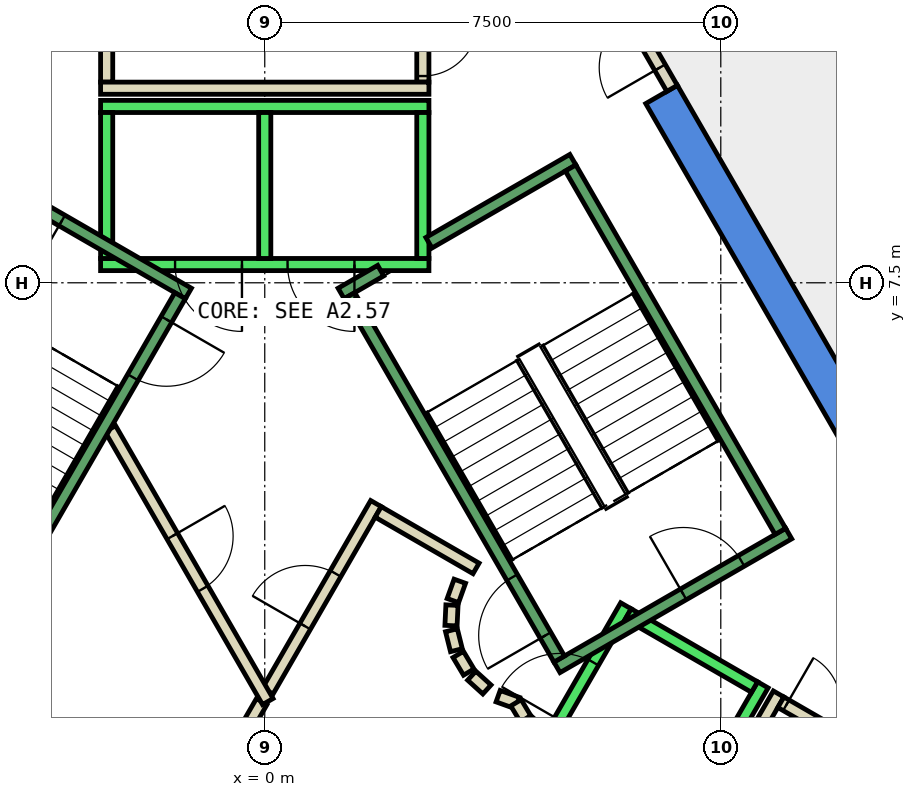
"""IFC4 building model, lengths in metres.
Left out: names, types, materials, properties, quantities, classifications, styles, units other than length and angle.
Written with IfcOpenShell. Run it as: python <this file> out.ifc"""

import sys

from ifc_helpers import new_model, si_unit, direction, frame, frame_2d, origin, place, context, subcontext, project, spatial, polyline, rectangle, outline, extrude, element, fill, save


model = new_model("IFC4")
c1 = context("Model", 3, precision=1e-05, world=origin(), true_north=direction((0.0, 1.0)))
c2 = subcontext(c1, "Body", "Model", "MODEL_VIEW")
j1 = project(units=[si_unit("LENGTHUNIT", "METRE"), si_unit("PLANEANGLEUNIT", "RADIAN")], contexts=[c1])
p1 = place(None, origin())
s1 = spatial("IfcSite", under=j1, at=p1, CompositionType="ELEMENT")
p2 = place(p1, origin())
s2 = spatial("IfcBuilding", under=s1, at=p2, CompositionType="ELEMENT")
p3 = place(p2, frame((0.0, 0.0, 270.2)))
s3 = spatial("IfcBuildingStorey", under=s2, at=p3, CompositionType="ELEMENT", Elevation=270.2)
p4 = place(p3, frame((0.0, 0.0, -0.34)))
e1 = element("IfcWall", 1, at=p4, inside=s3, PredefinedType="SHEAR", context=c2, shape_type="SweptSolid", body=[
    extrude(outline(polyline([(6.786, 10.747), (6.266, 10.447), (10.854, 2.5), (11.547, 2.5), (6.786, 10.747)])), origin(), (0.0, 0.0, 1.0), 3.6),
])
p5 = place(p3, frame((0.0, 0.0, -0.34)))
e2 = element("IfcWall", 2, at=p5, inside=s3, PredefinedType="SHEAR", context=c2, shape_type="SweptSolid", body=[
    extrude(outline(polyline([(5.774, -7.5), (11.547, 2.5), (10.854, 2.5), (5.427, -6.9), (5.774, -7.5)])), origin(), (0.0, 0.0, 1.0), 3.6),
])
p6 = place(p3, frame((9.281, 12.779, 0.0), z_axis=(0.0, 0.0, 1.0), x_axis=(0.515568955032, -0.856848091908, 0.0)))
e3 = element("IfcWall", 3, at=p6, inside=s3, PredefinedType="PARTITIONING", context=c2, shape_type="SweptSolid", body=[
    extrude(rectangle(XDim=3.177, YDim=0.2, at=frame_2d((1.588, 0.0))), origin(), (0.0, 0.0, 1.0), 3.26),
])
p7 = place(p3, frame((-2.6, 10.8, 0.0), z_axis=(0.0, 0.0, 1.0), x_axis=(0.0, 1.0, 0.0)))
e4 = element("IfcWall", 4, at=p7, inside=s3, PredefinedType="PARTITIONING", context=c2, shape_type="SweptSolid", body=[
    extrude(rectangle(XDim=1.1, YDim=0.2, at=frame_2d((0.55, 0.0))), origin(), (0.0, 0.0, 1.0), 3.26),
])
p8 = place(p3, frame((2.6, 11.9, 0.0), z_axis=(0.0, 0.0, 1.0), x_axis=(0.0, -1.0, 0.0)))
e5 = element("IfcWall", 5, at=p8, inside=s3, PredefinedType="PARTITIONING", context=c2, shape_type="SweptSolid", body=[
    extrude(rectangle(XDim=1.1, YDim=0.2, at=frame_2d((0.55, 0.0))), origin(), (0.0, 0.0, 1.0), 3.26),
])
p9 = place(p8, frame((0.1, 0.0, 0.0)))
e6 = element("IfcOpeningElement", 6, at=p9, cuts=e5, PredefinedType="OPENING", context=c2, shape_type="SweptSolid", body=[
    extrude(rectangle(XDim=0.9, YDim=2.1, at=frame_2d((0.45, 1.05))), frame((0.0, 0.11, 0.0), z_axis=(0.0, -1.0, 0.0), x_axis=(1.0, 0.0, 0.0)), (0.0, 0.0, 1.0), 0.22),
])
p10 = place(p3, frame((2.7, 10.7, 0.0), z_axis=(0.0, 0.0, 1.0), x_axis=(-1.0, 0.0, 0.0)))
e7 = element("IfcWall", 7, at=p10, inside=s3, PredefinedType="PARTITIONING", context=c2, shape_type="SweptSolid", body=[
    extrude(rectangle(XDim=5.4, YDim=0.2, at=frame_2d((2.7, 0.0))), origin(), (0.0, 0.0, 1.0), 3.26),
])
p11 = place(p3, frame((5.751, -3.938, 0.0), z_axis=(0.0, 0.0, 1.0), x_axis=(0.500034260056, 0.866005622828, 0.0)))
e8 = element("IfcWall", 8, at=p11, inside=s3, PredefinedType="PARTITIONING", context=c2, shape_type="SweptSolid", body=[
    extrude(rectangle(XDim=5.399, YDim=0.2, at=frame_2d((2.7, 0.0))), origin(), (0.0, 0.0, 1.0), 3.26),
])
p12 = place(p3, frame((8.488, 0.602, 0.0), z_axis=(0.0, 0.0, 1.0), x_axis=(0.866063652425, -0.499933745558, 0.0)))
e9 = element("IfcWall", 9, at=p12, inside=s3, PredefinedType="PARTITIONING", context=c2, shape_type="SweptSolid", body=[
    extrude(rectangle(XDim=1.1, YDim=0.2, at=frame_2d((0.55, 0.0))), origin(), (0.0, 0.0, 1.0), 3.26),
])
p13 = place(p12, frame((0.1, 0.0, 0.0)))
e10 = element("IfcOpeningElement", 10, at=p13, cuts=e9, PredefinedType="OPENING", context=c2, shape_type="SweptSolid", body=[
    extrude(rectangle(XDim=0.9, YDim=2.1, at=frame_2d((0.45, 1.05))), frame((0.0, 0.11, 0.0), z_axis=(0.0, -1.0, 0.0), x_axis=(1.0, 0.0, 0.0)), (0.0, 0.0, 1.0), 0.22),
])
p14 = place(p3, frame((-0.982, -1.0, 0.0), z_axis=(0.0, 0.0, 1.0), x_axis=(0.50024047865, 0.865886518847, 0.0)))
e11 = element("IfcWall", 11, at=p14, inside=s3, PredefinedType="PARTITIONING", context=c2, shape_type="SweptSolid", body=[
    extrude(rectangle(XDim=1.863, YDim=0.2, at=frame_2d((0.931, 0.0))), origin(), (0.0, 0.0, 1.0), 3.26),
])
p15 = place(p3, frame((0.05, 0.787, 0.0), z_axis=(0.0, 0.0, 1.0), x_axis=(0.499954076797, 0.866051915934, 0.0)))
e12 = element("IfcWall", 12, at=p15, inside=s3, PredefinedType="PARTITIONING", context=c2, shape_type="SweptSolid", body=[
    extrude(rectangle(XDim=3.558, YDim=0.2, at=frame_2d((1.779, 0.0))), origin(), (0.0, 0.0, 1.0), 3.26),
])
p16 = place(p15, frame((1.229, 0.0, 0.0)))
e13 = element("IfcOpeningElement", 13, at=p16, cuts=e12, PredefinedType="OPENING", context=c2, shape_type="SweptSolid", body=[
    extrude(rectangle(XDim=1.0, YDim=2.1, at=frame_2d((0.5, 1.05))), frame((0.0, 0.11, 0.0), z_axis=(0.0, -1.0, 0.0), x_axis=(1.0, 0.0, 0.0)), (0.0, 0.0, 1.0), 0.22),
])
p17 = place(p3, frame((1.866, 3.732, 0.0), z_axis=(0.0, 0.0, 1.0), x_axis=(0.866043361281, -0.499968895414, 0.0)))
e14 = element("IfcWall", 14, at=p17, inside=s3, PredefinedType="PARTITIONING", context=c2, shape_type="SweptSolid", body=[
    extrude(rectangle(XDim=1.858, YDim=0.2, at=frame_2d((0.929, 0.0))), origin(), (0.0, 0.0, 1.0), 3.26),
])
p18 = place(p3, frame((3.208, 2.592, 0.0), z_axis=(0.0, 0.0, 1.0), x_axis=(-0.337388820924, -0.941365382578, 0.0)))
e15 = element("IfcWall", 15, at=p18, inside=s3, PredefinedType="PARTITIONING", context=c2, shape_type="SweptSolid", body=[
    extrude(rectangle(XDim=0.338, YDim=0.2, at=frame_2d((0.169, 0.0))), origin(), (0.0, 0.0, 1.0), 3.26),
])
p19 = place(p3, frame((3.079, 2.199, 0.0), z_axis=(0.0, 0.0, 1.0), x_axis=(-0.047771483479, -0.998858290933, 0.0)))
e16 = element("IfcWall", 16, at=p19, inside=s3, PredefinedType="PARTITIONING", context=c2, shape_type="SweptSolid", body=[
    extrude(rectangle(XDim=0.337, YDim=0.2, at=frame_2d((0.169, 0.0))), origin(), (0.0, 0.0, 1.0), 3.26),
])
p20 = place(p3, frame((3.07, 1.786, 0.0), z_axis=(0.0, 0.0, 1.0), x_axis=(0.242705583207, -0.970099994784, 0.0)))
e17 = element("IfcWall", 17, at=p20, inside=s3, PredefinedType="PARTITIONING", context=c2, shape_type="SweptSolid", body=[
    extrude(rectangle(XDim=0.338, YDim=0.2, at=frame_2d((0.169, 0.0))), origin(), (0.0, 0.0, 1.0), 3.26),
])
for number, where, z_axis, x_axis in (
    (18, (3.182, 1.388, 0.0), (0.0, 0.0, 1.0), (0.512, -0.859, 0.0)),
    (19, (3.404, 1.039, 0.0), (0.0, 0.0, 1.0), (0.74, -0.672, 0.0)),
):
    element("IfcWall", number, at=place(p3, frame(where, z_axis=z_axis, x_axis=x_axis)), inside=s3, PredefinedType="PARTITIONING", context=c2, shape_type="SweptSolid", body=[
        extrude(rectangle(XDim=0.338, YDim=0.2, at=frame_2d((0.169, 0.0))), origin(), (0.0, 0.0, 1.0), 3.26),
    ])
p21 = place(p3, frame((3.838, 0.702, 0.0), z_axis=(0.0, 0.0, 1.0), x_axis=(0.941035081519, -0.338308993895, 0.0)))
e20 = element("IfcWall", 20, at=p21, inside=s3, PredefinedType="PARTITIONING", context=c2, shape_type="SweptSolid", body=[
    extrude(rectangle(XDim=0.337, YDim=0.2, at=frame_2d((0.168, 0.0))), origin(), (0.0, 0.0, 1.0), 3.26),
])
p22 = place(p3, frame((4.132, 0.593, 0.0), z_axis=(0.0, 0.0, 1.0), x_axis=(0.513561617048, -0.858052717201, 0.0)))
e21 = element("IfcWall", 21, at=p22, inside=s3, PredefinedType="PARTITIONING", context=c2, shape_type="SweptSolid", body=[
    extrude(rectangle(XDim=0.308, YDim=0.2, at=frame_2d((0.154, 0.0))), origin(), (0.0, 0.0, 1.0), 3.26),
])
p23 = place(p3, frame((4.301, 0.315, 0.0), z_axis=(0.0, 0.0, 1.0), x_axis=(0.741798017506, -0.670623367639, 0.0)))
e22 = element("IfcWall", 22, at=p23, inside=s3, PredefinedType="PARTITIONING", context=c2, shape_type="SweptSolid", body=[
    extrude(rectangle(XDim=0.309, YDim=0.2, at=frame_2d((0.154, 0.0))), origin(), (0.0, 0.0, 1.0), 3.26),
])
p24 = place(p3, frame((-2.54, 5.1, 0.0), z_axis=(0.0, 0.0, 1.0), x_axis=(0.499925051871, -0.866068670783, 0.0)))
e23 = element("IfcWall", 23, at=p24, inside=s3, PredefinedType="PARTITIONING", context=c2, shape_type="SweptSolid", body=[
    extrude(rectangle(XDim=5.181, YDim=0.2, at=frame_2d((2.59, 0.0))), origin(), (0.0, 0.0, 1.0), 3.26),
])
p25 = place(p24, frame((2.04, 0.0, 0.0)))
e24 = element("IfcOpeningElement", 24, at=p25, cuts=e23, PredefinedType="OPENING", context=c2, shape_type="SweptSolid", body=[
    extrude(rectangle(XDim=1.0, YDim=2.1, at=frame_2d((0.5, 1.05))), frame((0.0, 0.11, 0.0), z_axis=(0.0, -1.0, 0.0), x_axis=(1.0, 0.0, 0.0)), (0.0, 0.0, 1.0), 0.22),
])
p26 = place(p3, frame((6.699, 10.697, 0.0), z_axis=(0.0, 0.0, 1.0), x_axis=(-0.499914839587, 0.866074565589, 0.0)))
e25 = element("IfcWall", 25, at=p26, inside=s3, PredefinedType="PARTITIONING", context=c2, shape_type="SweptSolid", body=[
    extrude(rectangle(XDim=1.794, YDim=0.2, at=frame_2d((0.897, 0.0))), origin(), (0.0, 0.0, 1.0), 2.4),
])
p27 = place(p26, frame((0.397, 0.0, 0.0)))
e26 = element("IfcOpeningElement", 26, at=p27, cuts=e25, PredefinedType="OPENING", context=c2, shape_type="SweptSolid", body=[
    extrude(rectangle(XDim=1.0, YDim=2.1, at=frame_2d((0.5, 1.05))), frame((0.0, 0.11, 0.0), z_axis=(0.0, -1.0, 0.0), x_axis=(1.0, 0.0, 0.0)), (0.0, 0.0, 1.0), 0.22),
])
p28 = place(p3, frame((9.25, -4.878, 0.0), z_axis=(0.0, 0.0, 1.0), x_axis=(0.499982416899, 0.866035555154, 0.0)))
e27 = element("IfcWall", 27, at=p28, inside=s3, PredefinedType="PARTITIONING", context=c2, shape_type="SweptSolid", body=[
    extrude(rectangle(XDim=8.048, YDim=0.15, at=frame_2d((4.024, 0.0))), origin(), (0.0, 0.0, 1.0), 3.26),
])
p29 = place(p3, frame((2.7, 7.8, 0.0), z_axis=(0.0, 0.0, 1.0), x_axis=(-1.0, 0.0, 0.0)))
e28 = element("IfcWall", 28, at=p29, inside=s3, PredefinedType="STANDARD", context=c2, shape_type="SweptSolid", body=[
    extrude(rectangle(XDim=5.4, YDim=0.2, at=frame_2d((2.7, 0.0))), origin(), (0.0, 0.0, 1.0), 3.26),
])
p30 = place(p29, frame((1.225, 0.0, 0.0)))
e29 = element("IfcOpeningElement", 29, at=p30, cuts=e28, PredefinedType="OPENING", context=c2, shape_type="SweptSolid", body=[
    extrude(rectangle(XDim=1.1, YDim=2.1, at=frame_2d((0.55, 1.05))), frame((0.0, 0.11, 0.0), z_axis=(0.0, -1.0, 0.0), x_axis=(1.0, 0.0, 0.0)), (0.0, 0.0, 1.0), 0.22),
])
p31 = place(p29, frame((3.075, 0.0, 0.0)))
e30 = element("IfcOpeningElement", 30, at=p31, cuts=e28, PredefinedType="OPENING", context=c2, shape_type="SweptSolid", body=[
    extrude(rectangle(XDim=1.1, YDim=2.1, at=frame_2d((0.55, 1.05))), frame((0.0, 0.11, 0.0), z_axis=(0.0, -1.0, 0.0), x_axis=(1.0, 0.0, 0.0)), (0.0, 0.0, 1.0), 0.22),
])
p32 = place(p3, frame((2.7, 10.4, 0.0), z_axis=(0.0, 0.0, 1.0), x_axis=(-1.0, 0.0, 0.0)))
e31 = element("IfcWall", 31, at=p32, inside=s3, PredefinedType="STANDARD", context=c2, shape_type="SweptSolid", body=[
    extrude(rectangle(XDim=5.4, YDim=0.2, at=frame_2d((2.7, 0.0))), origin(), (0.0, 0.0, 1.0), 3.26),
])
for number, where, z_axis, x_axis in (
    (32, (2.6, 7.9, 0.0), (0.0, 0.0, 1.0), (0.0, 1.0, 0.0)),
    (33, (0.0, 7.9, 0.0), (0.0, 0.0, 1.0), (0.0, 1.0, 0.0)),
    (34, (-2.6, 7.9, 0.0), (0.0, 0.0, 1.0), (0.0, 1.0, 0.0)),
):
    element("IfcWall", number, at=place(p3, frame(where, z_axis=z_axis, x_axis=x_axis)), inside=s3, PredefinedType="STANDARD", context=c2, shape_type="SweptSolid", body=[
        extrude(rectangle(XDim=2.4, YDim=0.2, at=frame_2d((1.2, 0.0))), origin(), (0.0, 0.0, 1.0), 3.26),
    ])
p33 = place(p3, frame((-5.94, 2.188, 0.0), z_axis=(0.0, 0.0, 1.0), x_axis=(0.500034260056, -0.866005622828, 0.0)))
e35 = element("IfcWall", 35, at=p33, inside=s3, PredefinedType="STANDARD", context=c2, shape_type="SweptSolid", body=[
    extrude(rectangle(XDim=5.399, YDim=0.2, at=frame_2d((2.7, 0.0))), origin(), (0.0, 0.0, 1.0), 3.26),
])
p34 = place(p33, frame((3.075, 0.0, 0.0)))
e36 = element("IfcOpeningElement", 36, at=p34, cuts=e35, PredefinedType="OPENING", context=c2, shape_type="SweptSolid", body=[
    extrude(rectangle(XDim=1.1, YDim=2.1, at=frame_2d((0.55, 1.05))), frame((0.0, 0.11, 0.0), z_axis=(0.0, -1.0, 0.0), x_axis=(1.0, 0.0, 0.0)), (0.0, 0.0, 1.0), 0.22),
])
p35 = place(p33, frame((1.225, 0.0, 0.0)))
e37 = element("IfcOpeningElement", 37, at=p35, cuts=e35, PredefinedType="OPENING", context=c2, shape_type="SweptSolid", body=[
    extrude(rectangle(XDim=1.1, YDim=2.1, at=frame_2d((0.55, 1.05))), frame((0.0, 0.11, 0.0), z_axis=(0.0, -1.0, 0.0), x_axis=(1.0, 0.0, 0.0)), (0.0, 0.0, 1.0), 0.22),
])
p36 = place(p3, frame((3.24, -2.488, 0.0), z_axis=(0.0, 0.0, 1.0), x_axis=(0.500034260056, 0.866005622828, 0.0)))
e38 = element("IfcWall", 38, at=p36, inside=s3, PredefinedType="STANDARD", context=c2, shape_type="SweptSolid", body=[
    extrude(rectangle(XDim=5.399, YDim=0.2, at=frame_2d((2.7, 0.0))), origin(), (0.0, 0.0, 1.0), 3.26),
])
p37 = place(p36, frame((3.225, 0.0, 0.0)))
e39 = element("IfcOpeningElement", 39, at=p37, cuts=e38, PredefinedType="OPENING", context=c2, shape_type="SweptSolid", body=[
    extrude(rectangle(XDim=1.1, YDim=2.1, at=frame_2d((0.55, 1.05))), frame((0.0, 0.11, 0.0), z_axis=(0.0, -1.0, 0.0), x_axis=(1.0, 0.0, 0.0)), (0.0, 0.0, 1.0), 0.22),
])
p38 = place(p36, frame((1.225, 0.0, 0.0)))
e40 = element("IfcOpeningElement", 40, at=p38, cuts=e38, PredefinedType="OPENING", context=c2, shape_type="SweptSolid", body=[
    extrude(rectangle(XDim=1.1, YDim=2.1, at=frame_2d((0.55, 1.05))), frame((0.0, 0.11, 0.0), z_axis=(0.0, -1.0, 0.0), x_axis=(1.0, 0.0, 0.0)), (0.0, 0.0, 1.0), 0.22),
])
p39 = place(p3, frame((5.492, -3.788, 0.0), z_axis=(0.0, 0.0, 1.0), x_axis=(0.500034260056, 0.866005622828, 0.0)))
e41 = element("IfcWall", 41, at=p39, inside=s3, PredefinedType="STANDARD", context=c2, shape_type="SweptSolid", body=[
    extrude(rectangle(XDim=5.399, YDim=0.2, at=frame_2d((2.7, 0.0))), origin(), (0.0, 0.0, 1.0), 3.26),
])
p40 = place(p3, frame((5.977, 2.052, 0.0), z_axis=(0.0, 0.0, 1.0), x_axis=(0.865973769406, -0.500089422704, 0.0)))
e42 = element("IfcWall", 42, at=p40, inside=s3, PredefinedType="STANDARD", context=c2, shape_type="SweptSolid", body=[
    extrude(rectangle(XDim=2.399, YDim=0.2, at=frame_2d((1.2, 0.0))), origin(), (0.0, 0.0, 1.0), 3.26),
])
p41 = place(p3, frame((4.806, 1.176, 0.0), z_axis=(0.0, 0.0, 1.0), x_axis=(0.866059941101, 0.499940174841, 0.0)))
e43 = element("IfcWall", 43, at=p41, inside=s3, PredefinedType="STANDARD", context=c2, shape_type="SweptSolid", body=[
    extrude(rectangle(XDim=4.4, YDim=0.2, at=frame_2d((2.2, 0.0))), origin(), (0.0, 0.0, 1.0), 3.26),
])
p42 = place(p41, frame((2.4, 0.0, 0.0)))
e44 = element("IfcOpeningElement", 44, at=p42, cuts=e43, PredefinedType="OPENING", context=c2, shape_type="SweptSolid", body=[
    extrude(rectangle(XDim=1.1, YDim=2.2, at=frame_2d((0.55, 1.1))), frame((0.0, 0.11, 0.0), z_axis=(0.0, -1.0, 0.0), x_axis=(1.0, 0.0, 0.0)), (0.0, 0.0, 1.0), 0.22),
])
p43 = place(p3, frame((2.7, 8.158, 0.0), z_axis=(0.0, 0.0, 1.0), x_axis=(0.86611865017, 0.499838457731, 0.0)))
e45 = element("IfcWall", 45, at=p43, inside=s3, PredefinedType="STANDARD", context=c2, shape_type="SweptSolid", body=[
    extrude(rectangle(XDim=2.733, YDim=0.2, at=frame_2d((1.366, 0.0))), origin(), (0.0, 0.0, 1.0), 3.26),
])
p44 = place(p3, frame((1.256, 7.324, 0.0), z_axis=(0.0, 0.0, 1.0), x_axis=(0.865915093549, 0.500191014278, 0.0)))
e46 = element("IfcWall", 46, at=p44, inside=s3, PredefinedType="STANDARD", context=c2, shape_type="SweptSolid", body=[
    extrude(rectangle(XDim=0.752, YDim=0.2, at=frame_2d((0.376, 0.0))), origin(), (0.0, 0.0, 1.0), 3.26),
])
p45 = place(p3, frame((4.843, 1.312, 0.0), z_axis=(0.0, 0.0, 1.0), x_axis=(-0.499963383562, 0.866046543262, 0.0)))
e47 = element("IfcWall", 47, at=p45, inside=s3, PredefinedType="STANDARD", context=c2, shape_type="SweptSolid", body=[
    extrude(rectangle(XDim=6.9, YDim=0.2, at=frame_2d((3.45, 0.0))), origin(), (0.0, 0.0, 1.0), 3.26),
])
p46 = place(p45, frame((0.45, 0.0, 0.0)))
e48 = element("IfcOpeningElement", 48, at=p46, cuts=e47, PredefinedType="OPENING", context=c2, shape_type="SweptSolid", body=[
    extrude(rectangle(XDim=1.1, YDim=2.2, at=frame_2d((0.55, 1.1))), frame((0.0, 0.11, 0.0), z_axis=(0.0, -1.0, 0.0), x_axis=(1.0, 0.0, 0.0)), (0.0, 0.0, 1.0), 0.22),
])
p47 = place(p3, frame((8.48, 3.412, 0.0), z_axis=(0.0, 0.0, 1.0), x_axis=(-0.499978703459, 0.866037698999, 0.0)))
e49 = element("IfcWall", 49, at=p47, inside=s3, PredefinedType="STANDARD", context=c2, shape_type="SweptSolid", body=[
    extrude(rectangle(XDim=6.9, YDim=0.2, at=frame_2d((3.45, 0.0))), origin(), (0.0, 0.0, 1.0), 3.26),
])
p48 = place(p3, frame((-1.256, 7.324, 0.0), z_axis=(0.0, 0.0, 1.0), x_axis=(-0.866046073146, 0.499964197906, 0.0)))
e50 = element("IfcWall", 50, at=p48, inside=s3, PredefinedType="STANDARD", context=c2, shape_type="SweptSolid", body=[
    extrude(rectangle(XDim=4.4, YDim=0.2, at=frame_2d((2.2, 0.0))), origin(), (0.0, 0.0, 1.0), 3.26),
])
p49 = place(p48, frame((2.4, 0.0, 0.0)))
e51 = element("IfcOpeningElement", 51, at=p49, cuts=e50, PredefinedType="OPENING", context=c2, shape_type="SweptSolid", body=[
    extrude(rectangle(XDim=1.1, YDim=2.2, at=frame_2d((0.55, 1.1))), frame((0.0, 0.11, 0.0), z_axis=(0.0, -1.0, 0.0), x_axis=(1.0, 0.0, 0.0)), (0.0, 0.0, 1.0), 0.22),
])
p50 = place(p3, frame((-1.393, 7.288, 0.0), z_axis=(0.0, 0.0, 1.0), x_axis=(-0.499963383562, -0.866046543262, 0.0)))
e52 = element("IfcWall", 52, at=p50, inside=s3, PredefinedType="STANDARD", context=c2, shape_type="SweptSolid", body=[
    extrude(rectangle(XDim=6.9, YDim=0.2, at=frame_2d((3.45, 0.0))), origin(), (0.0, 0.0, 1.0), 3.26),
])
p51 = place(p50, frame((0.45, 0.0, 0.0)))
e53 = element("IfcOpeningElement", 53, at=p51, cuts=e52, PredefinedType="OPENING", context=c2, shape_type="SweptSolid", body=[
    extrude(rectangle(XDim=1.1, YDim=2.2, at=frame_2d((0.55, 1.1))), frame((0.0, 0.11, 0.0), z_axis=(0.0, -1.0, 0.0), x_axis=(1.0, 0.0, 0.0)), (0.0, 0.0, 1.0), 0.22),
])
p52 = place(p16, origin())
e54 = element("IfcDoor", 54, at=p52, inside=s3, OperationType="SINGLE_SWING_RIGHT", PredefinedType="DOOR", context=c2, shape_type="SweptSolid", body=[
    extrude(rectangle(XDim=1.0, YDim=2.1, at=frame_2d((0.5, 1.05))), frame((0.0, 0.025, 0.0), z_axis=(0.0, -1.0, 0.0), x_axis=(1.0, 0.0, 0.0)), (0.0, 0.0, 1.0), 0.05),
])
fill(e13, e54)
p53 = place(p25, origin())
e55 = element("IfcDoor", 55, at=p53, inside=s3, OperationType="SINGLE_SWING_RIGHT", PredefinedType="DOOR", context=c2, shape_type="SweptSolid", body=[
    extrude(rectangle(XDim=1.0, YDim=2.1, at=frame_2d((0.5, 1.05))), frame((0.0, 0.025, 0.0), z_axis=(0.0, -1.0, 0.0), x_axis=(1.0, 0.0, 0.0)), (0.0, 0.0, 1.0), 0.05),
])
fill(e24, e55)
p54 = place(p9, origin())
e56 = element("IfcDoor", 56, at=p54, inside=s3, OperationType="SINGLE_SWING_LEFT", PredefinedType="DOOR", context=c2, shape_type="SweptSolid", body=[
    extrude(rectangle(XDim=0.9, YDim=2.1, at=frame_2d((0.45, 1.05))), frame((0.0, 0.025, 0.0), z_axis=(0.0, -1.0, 0.0), x_axis=(1.0, 0.0, 0.0)), (0.0, 0.0, 1.0), 0.05),
])
fill(e6, e56)
p55 = place(p13, origin())
e57 = element("IfcDoor", 57, at=p55, inside=s3, OperationType="SINGLE_SWING_RIGHT", PredefinedType="DOOR", context=c2, shape_type="SweptSolid", body=[
    extrude(rectangle(XDim=0.9, YDim=2.1, at=frame_2d((0.45, 1.05))), frame((0.0, 0.025, 0.0), z_axis=(0.0, -1.0, 0.0), x_axis=(1.0, 0.0, 0.0)), (0.0, 0.0, 1.0), 0.05),
])
fill(e10, e57)
p56 = place(p27, origin())
e58 = element("IfcDoor", 58, at=p56, inside=s3, OperationType="SINGLE_SWING_LEFT", PredefinedType="DOOR", context=c2, shape_type="SweptSolid", body=[
    extrude(rectangle(XDim=1.0, YDim=2.1, at=frame_2d((0.5, 1.05))), frame((0.0, 0.025, 0.0), z_axis=(0.0, -1.0, 0.0), x_axis=(1.0, 0.0, 0.0)), (0.0, 0.0, 1.0), 0.05),
])
fill(e26, e58)
p57 = place(p30, origin())
e59 = element("IfcDoor", 59, at=p57, inside=s3, OperationType="SLIDING_TO_LEFT", PredefinedType="DOOR", context=c2, shape_type="SweptSolid", body=[
    extrude(rectangle(XDim=1.1, YDim=2.1, at=frame_2d((0.55, 1.05))), frame((0.0, 0.025, 0.0), z_axis=(0.0, -1.0, 0.0), x_axis=(1.0, 0.0, 0.0)), (0.0, 0.0, 1.0), 0.05),
])
fill(e29, e59)
p58 = place(p31, origin())
e60 = element("IfcDoor", 60, at=p58, inside=s3, OperationType="SLIDING_TO_LEFT", PredefinedType="DOOR", context=c2, shape_type="SweptSolid", body=[
    extrude(rectangle(XDim=1.1, YDim=2.1, at=frame_2d((0.55, 1.05))), frame((0.0, 0.025, 0.0), z_axis=(0.0, -1.0, 0.0), x_axis=(1.0, 0.0, 0.0)), (0.0, 0.0, 1.0), 0.05),
])
fill(e30, e60)
p59 = place(p37, origin())
e61 = element("IfcDoor", 61, at=p59, inside=s3, OperationType="SLIDING_TO_LEFT", PredefinedType="DOOR", context=c2, shape_type="SweptSolid", body=[
    extrude(rectangle(XDim=1.1, YDim=2.1, at=frame_2d((0.55, 1.05))), frame((0.0, 0.025, 0.0), z_axis=(0.0, -1.0, 0.0), x_axis=(1.0, 0.0, 0.0)), (0.0, 0.0, 1.0), 0.05),
])
fill(e39, e61)
p60 = place(p46, origin())
e62 = element("IfcDoor", 62, at=p60, inside=s3, OperationType="SINGLE_SWING_LEFT", PredefinedType="DOOR", context=c2, shape_type="SweptSolid", body=[
    extrude(rectangle(XDim=1.1, YDim=2.2, at=frame_2d((0.55, 1.1))), frame((0.0, 0.025, 0.0), z_axis=(0.0, -1.0, 0.0), x_axis=(1.0, 0.0, 0.0)), (0.0, 0.0, 1.0), 0.05),
])
fill(e48, e62)
p61 = place(p42, origin())
e63 = element("IfcDoor", 63, at=p61, inside=s3, OperationType="SINGLE_SWING_LEFT", PredefinedType="DOOR", context=c2, shape_type="SweptSolid", body=[
    extrude(rectangle(XDim=1.1, YDim=2.2, at=frame_2d((0.55, 1.1))), frame((0.0, 0.025, 0.0), z_axis=(0.0, -1.0, 0.0), x_axis=(1.0, 0.0, 0.0)), (0.0, 0.0, 1.0), 0.05),
])
fill(e44, e63)
p62 = place(p51, origin())
e64 = element("IfcDoor", 64, at=p62, inside=s3, OperationType="SINGLE_SWING_LEFT", PredefinedType="DOOR", context=c2, shape_type="SweptSolid", body=[
    extrude(rectangle(XDim=1.1, YDim=2.2, at=frame_2d((0.55, 1.1))), frame((0.0, 0.025, 0.0), z_axis=(0.0, -1.0, 0.0), x_axis=(1.0, 0.0, 0.0)), (0.0, 0.0, 1.0), 0.05),
])
fill(e53, e64)
p63 = place(p49, origin())
e65 = element("IfcDoor", 65, at=p63, inside=s3, OperationType="SINGLE_SWING_LEFT", PredefinedType="DOOR", context=c2, shape_type="SweptSolid", body=[
    extrude(rectangle(XDim=1.1, YDim=2.2, at=frame_2d((0.55, 1.1))), frame((0.0, 0.025, 0.0), z_axis=(0.0, -1.0, 0.0), x_axis=(1.0, 0.0, 0.0)), (0.0, 0.0, 1.0), 0.05),
])
fill(e51, e65)
save(model, sys.argv[1])
